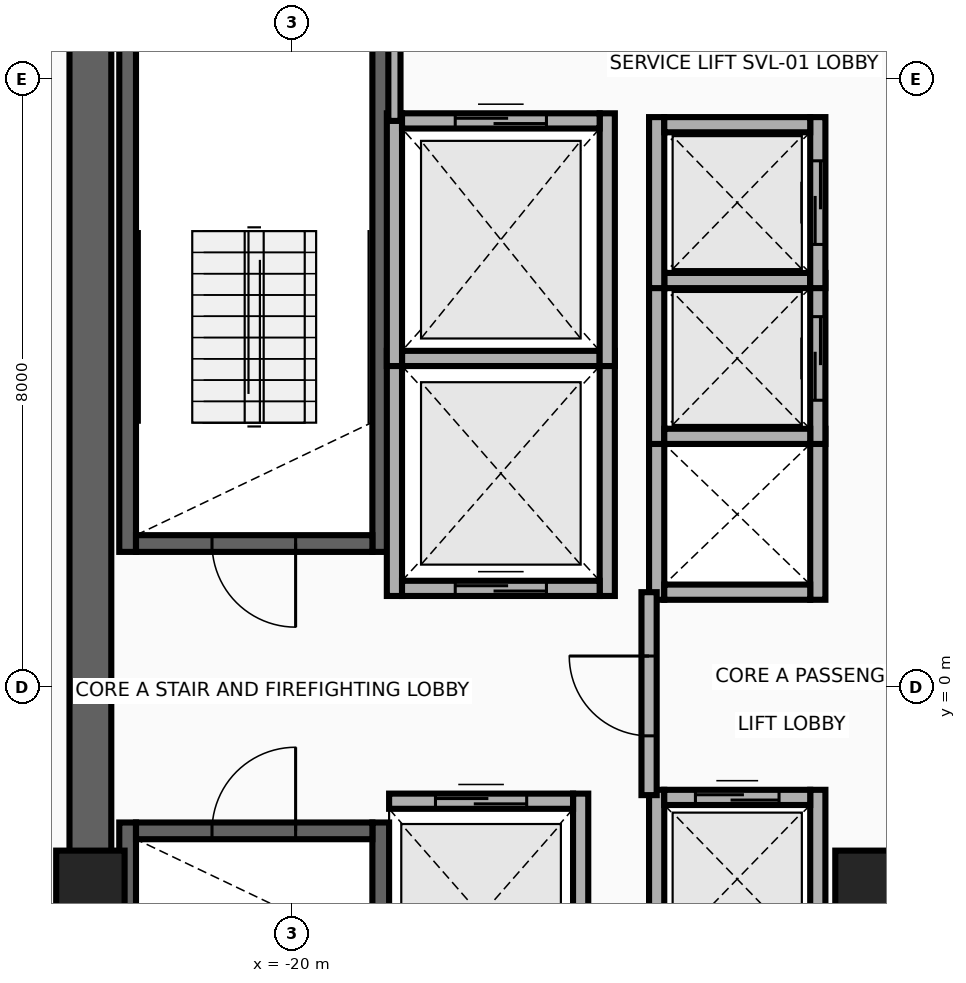
"""IFC4 building model, lengths in metres.
Left out: names, types, materials, properties, quantities, classifications, styles, units other than length and angle.
Written with IfcOpenShell. Run it as: python <this file> out.ifc"""

import sys

from ifc_helpers import new_model, si_unit, direction, frame, frame_2d, origin, origin_2d, place, context, subcontext, project, spatial, rectangle, extrude, source, transform, mapped, element, fill, save


model = new_model("IFC4")
c1 = context("Model", 3, precision=1e-05, world=origin(), true_north=direction((0.0, 1.0)))
c2 = subcontext(c1, "Body", "Model", "MODEL_VIEW")
j1 = project(units=[si_unit("LENGTHUNIT", "METRE"), si_unit("PLANEANGLEUNIT", "RADIAN")], contexts=[c1])
p1 = place(None, origin())
s1 = spatial("IfcSite", under=j1, at=p1, CompositionType="ELEMENT")
p2 = place(p1, origin())
s2 = spatial("IfcBuilding", under=s1, at=p2, CompositionType="ELEMENT")
p3 = place(p2, frame((0.0, 0.0, 205.5)))
s3 = spatial("IfcBuildingStorey", under=s2, at=p3, CompositionType="ELEMENT", Elevation=205.5)
for number, where, z_axis, x_axis in (
    (1, (-22.16, 1.78, 0.0), (0.0, 0.0, 1.0), (0.0, 1.0, 0.0)),
    (2, (-18.83, 1.78, 0.0), (0.0, 0.0, 1.0), (0.0, 1.0, 0.0)),
):
    element("IfcWall", number, at=place(p3, frame(where, z_axis=z_axis, x_axis=x_axis)), inside=s3, PredefinedType="SHEAR", context=c2, shape_type="SweptSolid", body=[
        extrude(rectangle(XDim=8.745, YDim=0.22, at=frame_2d((4.373, 0.0))), origin(), (0.0, 0.0, 1.0), 3.26),
    ])
p4 = place(p3, frame((-22.05, 1.89, 0.0), z_axis=(0.0, 0.0, 1.0), x_axis=(1.0, 0.0, 0.0)))
e3 = element("IfcWall", 3, at=p4, inside=s3, PredefinedType="SHEAR", context=c2, shape_type="SweptSolid", body=[
    extrude(rectangle(XDim=3.11, YDim=0.22, at=frame_2d((1.555, 0.0))), origin(), (0.0, 0.0, 1.0), 3.26),
])
p5 = place(p4, frame((1.0, 0.0, 0.0)))
e4 = element("IfcOpeningElement", 4, at=p5, cuts=e3, PredefinedType="OPENING", context=c2, shape_type="SweptSolid", body=[
    extrude(rectangle(XDim=1.1, YDim=2.15, at=frame_2d((0.55, 1.075))), frame((0.0, 0.125, 0.0), z_axis=(0.0, -1.0, 0.0), x_axis=(1.0, 0.0, 0.0)), (0.0, 0.0, 1.0), 0.25),
])
for number, where, z_axis, x_axis in (
    (5, (-22.16, -10.525, 0.0), (0.0, 0.0, 1.0), (0.0, 1.0, 0.0)),
    (6, (-18.83, -10.525, 0.0), (0.0, 0.0, 1.0), (0.0, 1.0, 0.0)),
):
    element("IfcWall", number, at=place(p3, frame(where, z_axis=z_axis, x_axis=x_axis)), inside=s3, PredefinedType="SHEAR", context=c2, shape_type="SweptSolid", body=[
        extrude(rectangle(XDim=8.745, YDim=0.22, at=frame_2d((4.373, 0.0))), origin(), (0.0, 0.0, 1.0), 3.26),
    ])
p6 = place(p3, frame((-22.05, -1.89, 0.0), z_axis=(0.0, 0.0, 1.0), x_axis=(1.0, 0.0, 0.0)))
e7 = element("IfcWall", 7, at=p6, inside=s3, PredefinedType="SHEAR", context=c2, shape_type="SweptSolid", body=[
    extrude(rectangle(XDim=3.11, YDim=0.22, at=frame_2d((1.555, 0.0))), origin(), (0.0, 0.0, 1.0), 3.26),
])
p7 = place(p6, frame((1.0, 0.0, 0.0)))
e8 = element("IfcOpeningElement", 8, at=p7, cuts=e7, PredefinedType="OPENING", context=c2, shape_type="SweptSolid", body=[
    extrude(rectangle(XDim=1.1, YDim=2.15, at=frame_2d((0.55, 1.075))), frame((0.0, 0.125, 0.0), z_axis=(0.0, -1.0, 0.0), x_axis=(1.0, 0.0, 0.0)), (0.0, 0.0, 1.0), 0.25),
])
p8 = place(p3, frame((-22.65, -11.075, 0.0), z_axis=(0.0, 0.0, 1.0), x_axis=(0.0, 1.0, 0.0)))
e9 = element("IfcWall", 9, at=p8, inside=s3, PredefinedType="SHEAR", context=c2, shape_type="SweptSolid", body=[
    extrude(rectangle(XDim=22.15, YDim=0.55, at=frame_2d((11.075, 0.0))), origin(), (0.0, 0.0, 1.0), 3.26),
])
m1 = source(origin(), c2, "Body", "SweptSolid", [
    extrude(rectangle(XDim=0.9, YDim=0.9, at=origin_2d()), origin(), (0.0, 0.0, 1.0), 3.5),
])
for number, where, z_axis, x_axis in (
    (10, (-22.65, -2.6, 0.0), (0.0, 0.0, 1.0), (1.0, 0.0, 0.0)),
    (11, (-12.4, -2.6, 0.0), (0.0, 0.0, 1.0), (1.0, 0.0, 0.0)),
):
    element("IfcColumn", number, at=place(p3, frame(where, z_axis=z_axis, x_axis=x_axis)), inside=s3, PredefinedType="COLUMN", context=c2, shape_type="MappedRepresentation", body=[
        mapped(m1, transform((0.0, 0.0, 0.0), x_axis=(1.0, 0.0, 0.0), y_axis=(0.0, 1.0, 0.0), z_axis=(0.0, 0.0, 1.0), scale=1.0)),
    ])
for number, where, z_axis, x_axis in (
    (12, (-18.65, 1.2, 0.0), (0.0, 0.0, 1.0), (0.0, 1.0, 0.0)),
    (13, (-15.85, 1.2, 0.0), (0.0, 0.0, 1.0), (0.0, 1.0, 0.0)),
):
    element("IfcWall", number, at=place(p3, frame(where, z_axis=z_axis, x_axis=x_axis)), inside=s3, PredefinedType="MOVABLE", context=c2, shape_type="SweptSolid", body=[
        extrude(rectangle(XDim=3.225, YDim=0.2, at=frame_2d((1.613, 0.0))), origin(), (0.0, 0.0, 1.0), 3.26),
    ])
p9 = place(p3, frame((-18.55, 1.3, 0.0), z_axis=(0.0, 0.0, 1.0), x_axis=(1.0, 0.0, 0.0)))
e14 = element("IfcWall", 14, at=p9, inside=s3, PredefinedType="MOVABLE", context=c2, shape_type="SweptSolid", body=[
    extrude(rectangle(XDim=2.6, YDim=0.2, at=frame_2d((1.3, 0.0))), origin(), (0.0, 0.0, 1.0), 3.26),
])
p10 = place(p9, frame((0.7, 0.0, 0.0)))
e15 = element("IfcOpeningElement", 15, at=p10, cuts=e14, PredefinedType="OPENING", context=c2, shape_type="SweptSolid", body=[
    extrude(rectangle(XDim=1.2, YDim=2.1, at=frame_2d((0.6, 1.05))), frame((0.0, 0.115, 0.0), z_axis=(0.0, -1.0, 0.0), x_axis=(1.0, 0.0, 0.0)), (0.0, 0.0, 1.0), 0.23),
])
p11 = place(p3, frame((-18.55, 4.325, 0.0), z_axis=(0.0, 0.0, 1.0), x_axis=(1.0, 0.0, 0.0)))
e16 = element("IfcWall", 16, at=p11, inside=s3, PredefinedType="MOVABLE", context=c2, shape_type="SweptSolid", body=[
    extrude(rectangle(XDim=2.6, YDim=0.2, at=frame_2d((1.3, 0.0))), origin(), (0.0, 0.0, 1.0), 3.26),
])
p12 = place(p3, frame((-16.2, -4.6, 0.0), z_axis=(0.0, 0.0, 1.0), x_axis=(0.0, 1.0, 0.0)))
e17 = element("IfcWall", 17, at=p12, inside=s3, PredefinedType="MOVABLE", context=c2, shape_type="SweptSolid", body=[
    extrude(rectangle(XDim=3.2, YDim=0.2, at=frame_2d((1.6, 0.0))), origin(), (0.0, 0.0, 1.0), 3.26),
])
p13 = place(p3, frame((-18.72, -1.5, 0.0), z_axis=(0.0, 0.0, 1.0), x_axis=(1.0, 0.0, 0.0)))
e18 = element("IfcWall", 18, at=p13, inside=s3, PredefinedType="MOVABLE", context=c2, shape_type="SweptSolid", body=[
    extrude(rectangle(XDim=2.42, YDim=0.2, at=frame_2d((1.21, 0.0))), origin(), (0.0, 0.0, 1.0), 3.26),
])
p14 = place(p13, frame((0.61, 0.0, 0.0)))
e19 = element("IfcOpeningElement", 19, at=p14, cuts=e18, PredefinedType="OPENING", context=c2, shape_type="SweptSolid", body=[
    extrude(rectangle(XDim=1.2, YDim=2.1, at=frame_2d((0.6, 1.05))), frame((0.0, 0.115, 0.0), z_axis=(0.0, -1.0, 0.0), x_axis=(1.0, 0.0, 0.0)), (0.0, 0.0, 1.0), 0.23),
])
for number, where, z_axis, x_axis in (
    (20, (-18.65, 4.225, 0.0), (0.0, 0.0, 1.0), (0.0, 1.0, 0.0)),
    (21, (-15.85, 4.225, 0.0), (0.0, 0.0, 1.0), (0.0, 1.0, 0.0)),
):
    element("IfcWall", number, at=place(p3, frame(where, z_axis=z_axis, x_axis=x_axis)), inside=s3, PredefinedType="MOVABLE", context=c2, shape_type="SweptSolid", body=[
        extrude(rectangle(XDim=3.325, YDim=0.2, at=frame_2d((1.663, 0.0))), origin(), (0.0, 0.0, 1.0), 3.26),
    ])
p15 = place(p3, frame((-18.55, 7.45, 0.0), z_axis=(0.0, 0.0, 1.0), x_axis=(1.0, 0.0, 0.0)))
e22 = element("IfcWall", 22, at=p15, inside=s3, PredefinedType="MOVABLE", context=c2, shape_type="SweptSolid", body=[
    extrude(rectangle(XDim=2.6, YDim=0.2, at=frame_2d((1.3, 0.0))), origin(), (0.0, 0.0, 1.0), 3.26),
])
p16 = place(p15, frame((0.7, 0.0, 0.0)))
e23 = element("IfcOpeningElement", 23, at=p16, cuts=e22, PredefinedType="OPENING", context=c2, shape_type="SweptSolid", body=[
    extrude(rectangle(XDim=1.2, YDim=2.1, at=frame_2d((0.6, 1.05))), frame((0.0, 0.115, 0.0), z_axis=(0.0, -1.0, 0.0), x_axis=(1.0, 0.0, 0.0)), (0.0, 0.0, 1.0), 0.23),
])
for number, where, z_axis, x_axis in (
    (24, (-15.2, 1.15, 0.0), (0.0, 0.0, 1.0), (0.0, 1.0, 0.0)),
    (25, (-13.08, 1.15, 0.0), (0.0, 0.0, 1.0), (0.0, 1.0, 0.0)),
):
    element("IfcWall", number, at=place(p3, frame(where, z_axis=z_axis, x_axis=x_axis)), inside=s3, PredefinedType="MOVABLE", context=c2, shape_type="SweptSolid", body=[
        extrude(rectangle(XDim=2.25, YDim=0.2, at=frame_2d((1.125, 0.0))), origin(), (0.0, 0.0, 1.0), 3.26),
    ])
p17 = place(p3, frame((-15.1, 1.25, 0.0), z_axis=(0.0, 0.0, 1.0), x_axis=(1.0, 0.0, 0.0)))
e26 = element("IfcWall", 26, at=p17, inside=s3, PredefinedType="MOVABLE", context=c2, shape_type="SweptSolid", body=[
    extrude(rectangle(XDim=1.92, YDim=0.2, at=frame_2d((0.96, 0.0))), origin(), (0.0, 0.0, 1.0), 3.26),
])
p18 = place(p3, frame((-15.2, 3.2, 0.0), z_axis=(0.0, 0.0, 1.0), x_axis=(0.0, 1.0, 0.0)))
e27 = element("IfcWall", 27, at=p18, inside=s3, PredefinedType="MOVABLE", context=c2, shape_type="SweptSolid", body=[
    extrude(rectangle(XDim=2.25, YDim=0.2, at=frame_2d((1.125, 0.0))), origin(), (0.0, 0.0, 1.0), 3.26),
])
p19 = place(p3, frame((-13.08, 3.2, 0.0), z_axis=(0.0, 0.0, 1.0), x_axis=(0.0, 1.0, 0.0)))
e28 = element("IfcWall", 28, at=p19, inside=s3, PredefinedType="MOVABLE", context=c2, shape_type="SweptSolid", body=[
    extrude(rectangle(XDim=2.25, YDim=0.2, at=frame_2d((1.125, 0.0))), origin(), (0.0, 0.0, 1.0), 3.26),
])
p20 = place(p19, frame((0.575, 0.0, 0.0)))
e29 = element("IfcOpeningElement", 29, at=p20, cuts=e28, PredefinedType="OPENING", context=c2, shape_type="SweptSolid", body=[
    extrude(rectangle(XDim=1.1, YDim=2.1, at=frame_2d((0.55, 1.05))), frame((0.0, 0.115, 0.0), z_axis=(0.0, -1.0, 0.0), x_axis=(1.0, 0.0, 0.0)), (0.0, 0.0, 1.0), 0.23),
])
for number, where, z_axis, x_axis in (
    (30, (-15.1, 3.3, 0.0), (0.0, 0.0, 1.0), (1.0, 0.0, 0.0)),
    (31, (-15.1, 5.35, 0.0), (0.0, 0.0, 1.0), (1.0, 0.0, 0.0)),
):
    element("IfcWall", number, at=place(p3, frame(where, z_axis=z_axis, x_axis=x_axis)), inside=s3, PredefinedType="MOVABLE", context=c2, shape_type="SweptSolid", body=[
        extrude(rectangle(XDim=1.92, YDim=0.2, at=frame_2d((0.96, 0.0))), origin(), (0.0, 0.0, 1.0), 3.26),
    ])
p21 = place(p3, frame((-15.2, 5.25, 0.0), z_axis=(0.0, 0.0, 1.0), x_axis=(0.0, 1.0, 0.0)))
e32 = element("IfcWall", 32, at=p21, inside=s3, PredefinedType="MOVABLE", context=c2, shape_type="SweptSolid", body=[
    extrude(rectangle(XDim=2.25, YDim=0.2, at=frame_2d((1.125, 0.0))), origin(), (0.0, 0.0, 1.0), 3.26),
])
p22 = place(p3, frame((-13.08, 5.25, 0.0), z_axis=(0.0, 0.0, 1.0), x_axis=(0.0, 1.0, 0.0)))
e33 = element("IfcWall", 33, at=p22, inside=s3, PredefinedType="MOVABLE", context=c2, shape_type="SweptSolid", body=[
    extrude(rectangle(XDim=2.25, YDim=0.2, at=frame_2d((1.125, 0.0))), origin(), (0.0, 0.0, 1.0), 3.26),
])
p23 = place(p22, frame((0.575, 0.0, 0.0)))
e34 = element("IfcOpeningElement", 34, at=p23, cuts=e33, PredefinedType="OPENING", context=c2, shape_type="SweptSolid", body=[
    extrude(rectangle(XDim=1.1, YDim=2.1, at=frame_2d((0.55, 1.05))), frame((0.0, 0.115, 0.0), z_axis=(0.0, -1.0, 0.0), x_axis=(1.0, 0.0, 0.0)), (0.0, 0.0, 1.0), 0.23),
])
p24 = place(p3, frame((-15.1, 7.4, 0.0), z_axis=(0.0, 0.0, 1.0), x_axis=(1.0, 0.0, 0.0)))
e35 = element("IfcWall", 35, at=p24, inside=s3, PredefinedType="MOVABLE", context=c2, shape_type="SweptSolid", body=[
    extrude(rectangle(XDim=1.92, YDim=0.2, at=frame_2d((0.96, 0.0))), origin(), (0.0, 0.0, 1.0), 3.26),
])
for number, where, z_axis, x_axis in (
    (36, (-15.2, -3.7, 0.0), (0.0, 0.0, 1.0), (0.0, 1.0, 0.0)),
    (37, (-13.08, -3.7, 0.0), (0.0, 0.0, 1.0), (0.0, 1.0, 0.0)),
):
    element("IfcWall", number, at=place(p3, frame(where, z_axis=z_axis, x_axis=x_axis)), inside=s3, PredefinedType="MOVABLE", context=c2, shape_type="SweptSolid", body=[
        extrude(rectangle(XDim=2.35, YDim=0.2, at=frame_2d((1.175, 0.0))), origin(), (0.0, 0.0, 1.0), 3.26),
    ])
p25 = place(p3, frame((-15.1, -1.45, 0.0), z_axis=(0.0, 0.0, 1.0), x_axis=(1.0, 0.0, 0.0)))
e38 = element("IfcWall", 38, at=p25, inside=s3, PredefinedType="MOVABLE", context=c2, shape_type="SweptSolid", body=[
    extrude(rectangle(XDim=1.92, YDim=0.2, at=frame_2d((0.96, 0.0))), origin(), (0.0, 0.0, 1.0), 3.26),
])
p26 = place(p25, frame((0.41, 0.0, 0.0)))
e39 = element("IfcOpeningElement", 39, at=p26, cuts=e38, PredefinedType="OPENING", context=c2, shape_type="SweptSolid", body=[
    extrude(rectangle(XDim=1.1, YDim=2.1, at=frame_2d((0.55, 1.05))), frame((0.0, 0.115, 0.0), z_axis=(0.0, -1.0, 0.0), x_axis=(1.0, 0.0, 0.0)), (0.0, 0.0, 1.0), 0.23),
])
p27 = place(p3, frame((-15.3, -1.42, 0.0), z_axis=(0.0, 0.0, 1.0), x_axis=(0.0, 1.0, 0.0)))
e40 = element("IfcWall", 40, at=p27, inside=s3, PredefinedType="PARTITIONING", context=c2, shape_type="SweptSolid", body=[
    extrude(rectangle(XDim=2.67, YDim=0.2, at=frame_2d((1.335, 0.0))), origin(), (0.0, 0.0, 1.0), 3.26),
])
p28 = place(p27, frame((0.78, 0.0, 0.0)))
e41 = element("IfcOpeningElement", 41, at=p28, cuts=e40, PredefinedType="OPENING", context=c2, shape_type="SweptSolid", body=[
    extrude(rectangle(XDim=1.05, YDim=2.15, at=frame_2d((0.525, 1.075))), frame((0.0, 0.115, 0.0), z_axis=(0.0, -1.0, 0.0), x_axis=(1.0, 0.0, 0.0)), (0.0, 0.0, 1.0), 0.23),
])
p29 = place(p3, frame((-18.65, 7.45, 0.0), z_axis=(0.0, 0.0, 1.0), x_axis=(0.0, 1.0, 0.0)))
e42 = element("IfcWall", 42, at=p29, inside=s3, PredefinedType="PARTITIONING", context=c2, shape_type="SweptSolid", body=[
    extrude(rectangle(XDim=2.93, YDim=0.16, at=frame_2d((1.465, 0.0))), origin(), (0.0, 0.0, 1.0), 3.26),
])
p30 = place(p10, origin())
e43 = element("IfcDoor", 43, at=p30, inside=s3, OperationType="DOUBLE_DOOR_SLIDING", PredefinedType="DOOR", context=c2, shape_type="SweptSolid", body=[
    extrude(rectangle(XDim=1.2, YDim=2.1, at=frame_2d((0.6, 1.05))), frame((0.0, 0.025, 0.0), z_axis=(0.0, -1.0, 0.0), x_axis=(1.0, 0.0, 0.0)), (0.0, 0.0, 1.0), 0.05),
])
fill(e15, e43)
p31 = place(p14, origin())
e44 = element("IfcDoor", 44, at=p31, inside=s3, OperationType="DOUBLE_DOOR_SLIDING", PredefinedType="DOOR", context=c2, shape_type="SweptSolid", body=[
    extrude(rectangle(XDim=1.2, YDim=2.1, at=frame_2d((0.6, 1.05))), frame((0.0, 0.025, 0.0), z_axis=(0.0, -1.0, 0.0), x_axis=(1.0, 0.0, 0.0)), (0.0, 0.0, 1.0), 0.05),
])
fill(e19, e44)
p32 = place(p16, origin())
e45 = element("IfcDoor", 45, at=p32, inside=s3, OperationType="DOUBLE_DOOR_SLIDING", PredefinedType="DOOR", context=c2, shape_type="SweptSolid", body=[
    extrude(rectangle(XDim=1.2, YDim=2.1, at=frame_2d((0.6, 1.05))), frame((0.0, 0.025, 0.0), z_axis=(0.0, -1.0, 0.0), x_axis=(1.0, 0.0, 0.0)), (0.0, 0.0, 1.0), 0.05),
])
fill(e23, e45)
p33 = place(p20, origin())
e46 = element("IfcDoor", 46, at=p33, inside=s3, OperationType="DOUBLE_DOOR_SLIDING", PredefinedType="DOOR", context=c2, shape_type="SweptSolid", body=[
    extrude(rectangle(XDim=1.1, YDim=2.1, at=frame_2d((0.55, 1.05))), frame((0.0, 0.025, 0.0), z_axis=(0.0, -1.0, 0.0), x_axis=(1.0, 0.0, 0.0)), (0.0, 0.0, 1.0), 0.05),
])
fill(e29, e46)
p34 = place(p23, origin())
e47 = element("IfcDoor", 47, at=p34, inside=s3, OperationType="DOUBLE_DOOR_SLIDING", PredefinedType="DOOR", context=c2, shape_type="SweptSolid", body=[
    extrude(rectangle(XDim=1.1, YDim=2.1, at=frame_2d((0.55, 1.05))), frame((0.0, 0.025, 0.0), z_axis=(0.0, -1.0, 0.0), x_axis=(1.0, 0.0, 0.0)), (0.0, 0.0, 1.0), 0.05),
])
fill(e34, e47)
p35 = place(p26, origin())
e48 = element("IfcDoor", 48, at=p35, inside=s3, OperationType="DOUBLE_DOOR_SLIDING", PredefinedType="DOOR", context=c2, shape_type="SweptSolid", body=[
    extrude(rectangle(XDim=1.1, YDim=2.1, at=frame_2d((0.55, 1.05))), frame((0.0, 0.025, 0.0), z_axis=(0.0, -1.0, 0.0), x_axis=(1.0, 0.0, 0.0)), (0.0, 0.0, 1.0), 0.05),
])
fill(e39, e48)
p36 = place(p28, origin())
e49 = element("IfcDoor", 49, at=p36, inside=s3, OperationType="SINGLE_SWING_RIGHT", PredefinedType="DOOR", context=c2, shape_type="SweptSolid", body=[
    extrude(rectangle(XDim=1.05, YDim=2.15, at=frame_2d((0.525, 1.075))), frame((0.0, 0.025, 0.0), z_axis=(0.0, -1.0, 0.0), x_axis=(1.0, 0.0, 0.0)), (0.0, 0.0, 1.0), 0.05),
])
fill(e41, e49)
p37 = place(p5, frame((1.1, 0.0, 0.0), z_axis=(0.0, 0.0, 1.0), x_axis=(-1.0, 0.0, 0.0)))
e50 = element("IfcDoor", 50, at=p37, inside=s3, OperationType="SINGLE_SWING_LEFT", PredefinedType="DOOR", context=c2, shape_type="SweptSolid", body=[
    extrude(rectangle(XDim=1.1, YDim=2.15, at=frame_2d((0.55, 1.075))), frame((0.0, 0.025, 0.0), z_axis=(0.0, -1.0, 0.0), x_axis=(1.0, 0.0, 0.0)), (0.0, 0.0, 1.0), 0.05),
])
fill(e4, e50)
p38 = place(p7, origin())
e51 = element("IfcDoor", 51, at=p38, inside=s3, OperationType="SINGLE_SWING_RIGHT", PredefinedType="DOOR", context=c2, shape_type="SweptSolid", body=[
    extrude(rectangle(XDim=1.1, YDim=2.15, at=frame_2d((0.55, 1.075))), frame((0.0, 0.025, 0.0), z_axis=(0.0, -1.0, 0.0), x_axis=(1.0, 0.0, 0.0)), (0.0, 0.0, 1.0), 0.05),
])
fill(e8, e51)
save(model, sys.argv[1])
